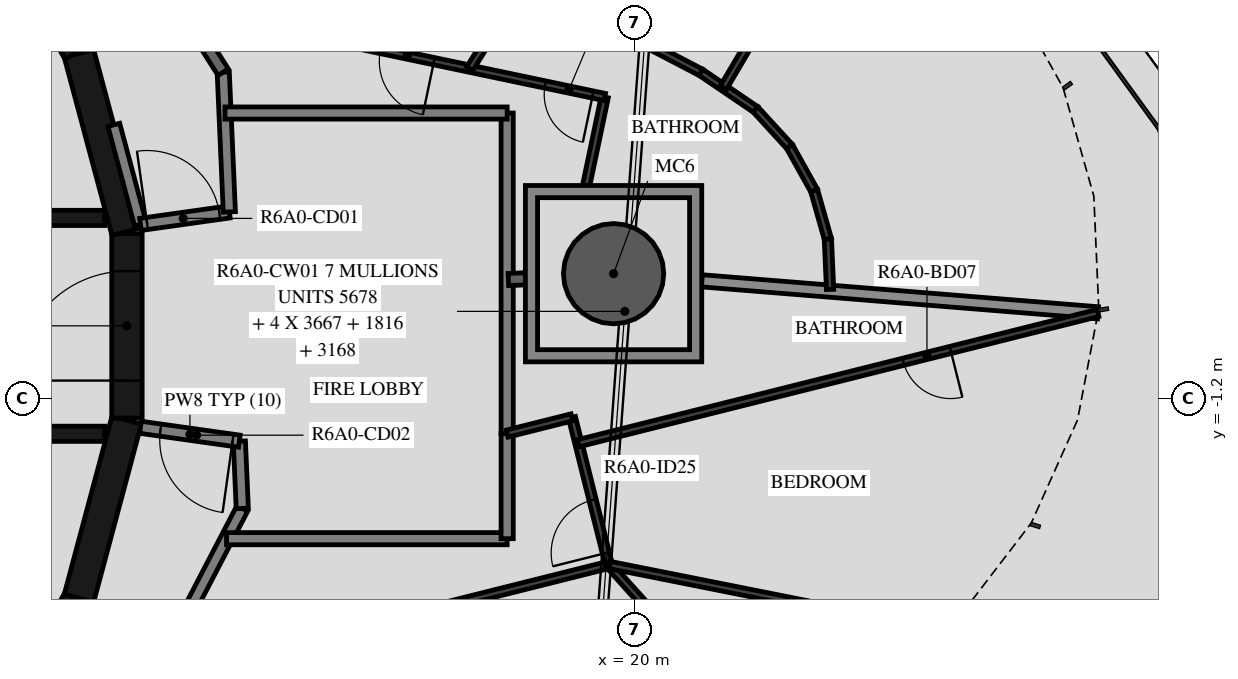
"""IFC4 building model, lengths in metres.
Left out: names, types, materials, properties, quantities, classifications, styles, units other than length and angle.
Written with IfcOpenShell. Run it as: python <this file> out.ifc"""

import sys

from ifc_helpers import new_model, si_unit, direction, frame, frame_2d, origin, origin_2d, place, context, subcontext, project, spatial, polyline, rectangle, hollow_circle, outline, extrude, element, fill, save


model = new_model("IFC4")
c1 = context("Model", 3, precision=1e-05, world=origin(), true_north=direction((0.0, 1.0)))
c2 = subcontext(c1, "Body", "Model", "MODEL_VIEW")
j1 = project(units=[si_unit("LENGTHUNIT", "METRE"), si_unit("PLANEANGLEUNIT", "RADIAN")], contexts=[c1])
p1 = place(None, origin())
s1 = spatial("IfcSite", under=j1, at=p1, CompositionType="ELEMENT")
p2 = place(p1, origin())
s2 = spatial("IfcBuilding", under=s1, at=p2, CompositionType="ELEMENT")
p3 = place(p2, frame((0.0, 0.0, 226.7)))
s3 = spatial("IfcBuildingStorey", under=s2, at=p3, CompositionType="ELEMENT", Elevation=226.7)
p4 = place(p3, frame((19.65, 0.858, -0.45), z_axis=(0.0, 0.0, 1.0), x_axis=(1.0, 0.0, 0.0)))
e1 = element("IfcColumn", 1, at=p4, inside=s3, PredefinedType="COLUMN", context=c2, shape_type="SweptSolid", body=[
    extrude(hollow_circle(Radius=0.825, WallThickness=0.04, at=origin_2d()), origin(), (0.0, 0.0, 1.0), 3.57),
])
for number, where, z_axis, x_axis in (
    (2, (9.329, -7.137, 0.0), (0.0, 0.0, 1.0), (0.5, 0.866, 0.0)),
    (3, (10.858, -4.479, 0.0), (0.0, 0.0, 1.0), (0.259, 0.966, 0.0)),
):
    element("IfcWall", number, at=place(p3, frame(where, z_axis=z_axis, x_axis=x_axis)), inside=s3, PredefinedType="SHEAR", context=c2, shape_type="SweptSolid", body=[
        extrude(rectangle(XDim=3.033, YDim=0.5, at=frame_2d((1.516, 0.0))), origin(), (0.0, 0.0, 1.0), 3.12),
    ])
p5 = place(p3, frame((11.647, -1.516, 0.0), z_axis=(0.0, 0.0, 1.0), x_axis=(0.0, 1.0, 0.0)))
e4 = element("IfcWall", 4, at=p5, inside=s3, PredefinedType="SHEAR", context=c2, shape_type="SweptSolid", body=[
    extrude(rectangle(XDim=3.033, YDim=0.5, at=frame_2d((1.516, 0.0))), origin(), (0.0, 0.0, 1.0), 3.12),
])
p6 = place(p5, frame((0.616, 0.0, 0.0)))
e5 = element("IfcOpeningElement", 5, at=p6, cuts=e4, PredefinedType="OPENING", context=c2, shape_type="SweptSolid", body=[
    extrude(rectangle(XDim=1.8, YDim=2.1, at=frame_2d((0.9, 1.05))), frame((0.0, 0.26, 0.0), z_axis=(0.0, -1.0, 0.0), x_axis=(1.0, 0.0, 0.0)), (0.0, 0.0, 1.0), 0.52),
])
for number, where, z_axis, x_axis in (
    (6, (11.643, 1.55, 0.0), (0.0, 0.0, 1.0), (-0.259, 0.966, 0.0)),
    (7, (10.845, 4.51, 0.0), (0.0, 0.0, 1.0), (-0.5, 0.866, 0.0)),
):
    element("IfcWall", number, at=place(p3, frame(where, z_axis=z_axis, x_axis=x_axis)), inside=s3, PredefinedType="SHEAR", context=c2, shape_type="SweptSolid", body=[
        extrude(rectangle(XDim=3.033, YDim=0.5, at=frame_2d((1.516, 0.0))), origin(), (0.0, 0.0, 1.0), 3.12),
    ])
p7 = place(p3, frame((3.35, 1.775, 0.0), z_axis=(0.0, 0.0, 1.0), x_axis=(1.0, 0.0, 0.0)))
e8 = element("IfcWall", 8, at=p7, inside=s3, PredefinedType="SHEAR", context=c2, shape_type="SweptSolid", body=[
    extrude(rectangle(XDim=7.93, YDim=0.25, at=frame_2d((3.965, 0.0))), origin(), (0.0, 0.0, 1.0), 3.12),
])
p8 = place(p7, frame((0.35, 0.0, 0.0)))
e9 = element("IfcOpeningElement", 9, at=p8, cuts=e8, PredefinedType="OPENING", context=c2, shape_type="SweptSolid", body=[
    extrude(rectangle(XDim=1.2, YDim=2.4, at=frame_2d((0.6, 1.2))), frame((0.0, 0.135, 0.0), z_axis=(0.0, -1.0, 0.0), x_axis=(1.0, 0.0, 0.0)), (0.0, 0.0, 1.0), 0.27),
])
p9 = place(p7, frame((2.5, 0.0, 0.0)))
e10 = element("IfcOpeningElement", 10, at=p9, cuts=e8, PredefinedType="OPENING", context=c2, shape_type="SweptSolid", body=[
    extrude(rectangle(XDim=1.2, YDim=2.4, at=frame_2d((0.6, 1.2))), frame((0.0, 0.135, 0.0), z_axis=(0.0, -1.0, 0.0), x_axis=(1.0, 0.0, 0.0)), (0.0, 0.0, 1.0), 0.27),
])
p10 = place(p7, frame((4.8, 0.0, 0.0)))
e11 = element("IfcOpeningElement", 11, at=p10, cuts=e8, PredefinedType="OPENING", context=c2, shape_type="SweptSolid", body=[
    extrude(rectangle(XDim=0.9, YDim=2.1, at=frame_2d((0.45, 1.05))), frame((0.0, 0.135, 0.0), z_axis=(0.0, -1.0, 0.0), x_axis=(1.0, 0.0, 0.0)), (0.0, 0.0, 1.0), 0.27),
])
p11 = place(p3, frame((3.35, -1.775, 0.0), z_axis=(0.0, 0.0, 1.0), x_axis=(1.0, 0.0, 0.0)))
e12 = element("IfcWall", 12, at=p11, inside=s3, PredefinedType="SHEAR", context=c2, shape_type="SweptSolid", body=[
    extrude(rectangle(XDim=7.93, YDim=0.25, at=frame_2d((3.965, 0.0))), origin(), (0.0, 0.0, 1.0), 3.12),
])
p12 = place(p11, frame((0.4, 0.0, 0.0)))
e13 = element("IfcOpeningElement", 13, at=p12, cuts=e12, PredefinedType="OPENING", context=c2, shape_type="SweptSolid", body=[
    extrude(rectangle(XDim=1.1, YDim=2.4, at=frame_2d((0.55, 1.2))), frame((0.0, 0.135, 0.0), z_axis=(0.0, -1.0, 0.0), x_axis=(1.0, 0.0, 0.0)), (0.0, 0.0, 1.0), 0.27),
])
p13 = place(p11, frame((2.55, 0.0, 0.0)))
e14 = element("IfcOpeningElement", 14, at=p13, cuts=e12, PredefinedType="OPENING", context=c2, shape_type="SweptSolid", body=[
    extrude(rectangle(XDim=1.1, YDim=2.4, at=frame_2d((0.55, 1.2))), frame((0.0, 0.135, 0.0), z_axis=(0.0, -1.0, 0.0), x_axis=(1.0, 0.0, 0.0)), (0.0, 0.0, 1.0), 0.27),
])
p14 = place(p11, frame((4.7, 0.0, 0.0)))
e15 = element("IfcOpeningElement", 15, at=p14, cuts=e12, PredefinedType="OPENING", context=c2, shape_type="SweptSolid", body=[
    extrude(rectangle(XDim=1.1, YDim=2.4, at=frame_2d((0.55, 1.2))), frame((0.0, 0.135, 0.0), z_axis=(0.0, -1.0, 0.0), x_axis=(1.0, 0.0, 0.0)), (0.0, 0.0, 1.0), 0.27),
])
p15 = place(p3, frame((11.87, 1.668, 0.0), z_axis=(0.0, 0.0, 1.0), x_axis=(-0.258836880648, 0.965921047093, 0.0)))
e16 = element("IfcWall", 16, at=p15, inside=s3, PredefinedType="STANDARD", context=c2, shape_type="SweptSolid", body=[
    extrude(rectangle(XDim=1.695, YDim=0.2, at=frame_2d((0.848, 0.0))), origin(), (0.0, 0.0, 1.0), 3.12),
])
p16 = place(p3, frame((11.87, 1.668, 0.0), z_axis=(0.0, 0.0, 1.0), x_axis=(0.990267985606, 0.139173692496, 0.0)))
e17 = element("IfcWall", 17, at=p16, inside=s3, PredefinedType="STANDARD", context=c2, shape_type="SweptSolid", body=[
    extrude(rectangle(XDim=1.475, YDim=0.2, at=frame_2d((0.738, 0.0))), origin(), (0.0, 0.0, 1.0), 3.12),
])
p17 = place(p16, frame((0.11, 0.0, 0.0)))
e18 = element("IfcOpeningElement", 18, at=p17, cuts=e17, PredefinedType="OPENING", context=c2, shape_type="SweptSolid", body=[
    extrude(rectangle(XDim=1.2, YDim=2.1, at=frame_2d((0.6, 1.05))), frame((0.0, 0.11, 0.0), z_axis=(0.0, -1.0, 0.0), x_axis=(1.0, 0.0, 0.0)), (0.0, 0.0, 1.0), 0.22),
])
p18 = place(p3, frame((13.331, 1.874, 0.0), z_axis=(0.0, 0.0, 1.0), x_axis=(-0.043621457762, 0.999048131184, 0.0)))
e19 = element("IfcWall", 19, at=p18, inside=s3, PredefinedType="STANDARD", context=c2, shape_type="SweptSolid", body=[
    extrude(rectangle(XDim=2.3, YDim=0.2, at=frame_2d((1.15, 0.0))), origin(), (0.0, 0.0, 1.0), 3.12),
])
p19 = place(p3, frame((13.231, 4.172, 0.0), z_axis=(0.0, 0.0, 1.0), x_axis=(-0.537304397561, 0.843388394728, 0.0)))
e20 = element("IfcWall", 20, at=p19, inside=s3, PredefinedType="STANDARD", context=c2, shape_type="SweptSolid", body=[
    extrude(rectangle(XDim=7.181, YDim=0.2, at=frame_2d((3.59, 0.0))), origin(), (0.0, 0.0, 1.0), 3.12),
])
p20 = place(p19, frame((2.881, 0.0, 0.0)))
e21 = element("IfcOpeningElement", 21, at=p20, cuts=e20, PredefinedType="OPENING", context=c2, shape_type="SweptSolid", body=[
    extrude(rectangle(XDim=1.0, YDim=2.1, at=frame_2d((0.5, 1.05))), frame((0.0, 0.11, 0.0), z_axis=(0.0, -1.0, 0.0), x_axis=(1.0, 0.0, 0.0)), (0.0, 0.0, 1.0), 0.22),
])
p21 = place(p19, frame((5.681, 0.0, 0.0)))
e22 = element("IfcOpeningElement", 22, at=p21, cuts=e20, PredefinedType="OPENING", context=c2, shape_type="SweptSolid", body=[
    extrude(rectangle(XDim=1.0, YDim=2.1, at=frame_2d((0.5, 1.05))), frame((0.0, 0.11, 0.0), z_axis=(0.0, -1.0, 0.0), x_axis=(1.0, 0.0, 0.0)), (0.0, 0.0, 1.0), 0.22),
])
p22 = place(p3, frame((10.228, -9.372, 0.0), z_axis=(0.0, 0.0, 1.0), x_axis=(0.461759464021, 0.887005184532, 0.0)))
e23 = element("IfcWall", 23, at=p22, inside=s3, PredefinedType="STANDARD", context=c2, shape_type="SweptSolid", body=[
    extrude(rectangle(XDim=7.181, YDim=0.2, at=frame_2d((3.591, 0.0))), origin(), (0.0, 0.0, 1.0), 3.12),
])
p23 = place(p3, frame((13.544, -3.003, 0.0), z_axis=(0.0, 0.0, 1.0), x_axis=(-0.043666917606, 0.999046145234, 0.0)))
e24 = element("IfcWall", 24, at=p23, inside=s3, PredefinedType="STANDARD", context=c2, shape_type="SweptSolid", body=[
    extrude(rectangle(XDim=1.107, YDim=0.2, at=frame_2d((0.553, 0.0))), origin(), (0.0, 0.0, 1.0), 3.12),
])
p24 = place(p3, frame((13.496, -1.897, 0.0), z_axis=(0.0, 0.0, 1.0), x_axis=(-0.99026234641, 0.139213811391, 0.0)))
e25 = element("IfcWall", 25, at=p24, inside=s3, PredefinedType="STANDARD", context=c2, shape_type="SweptSolid", body=[
    extrude(rectangle(XDim=1.641, YDim=0.2, at=frame_2d((0.821, 0.0))), origin(), (0.0, 0.0, 1.0), 3.12),
])
p25 = place(p24, frame((0.11, 0.0, 0.0)))
e26 = element("IfcOpeningElement", 26, at=p25, cuts=e25, PredefinedType="OPENING", context=c2, shape_type="SweptSolid", body=[
    extrude(rectangle(XDim=1.2, YDim=2.1, at=frame_2d((0.6, 1.05))), frame((0.0, 0.11, 0.0), z_axis=(0.0, -1.0, 0.0), x_axis=(1.0, 0.0, 0.0)), (0.0, 0.0, 1.0), 0.22),
])
p26 = place(p3, frame((17.9, -1.772, 0.0), z_axis=(0.0, 0.0, 1.0), x_axis=(0.0, 1.0, 0.0)))
e27 = element("IfcWall", 27, at=p26, inside=s3, PredefinedType="STANDARD", context=c2, shape_type="SweptSolid", body=[
    extrude(rectangle(XDim=5.272, YDim=0.2, at=frame_2d((2.636, 0.0))), origin(), (0.0, 0.0, 1.0), 3.12),
])
p27 = place(p3, frame((17.9, 3.5, 0.0), z_axis=(0.0, 0.0, 1.0), x_axis=(-1.0, 0.0, 0.0)))
e28 = element("IfcWall", 28, at=p27, inside=s3, PredefinedType="STANDARD", context=c2, shape_type="SweptSolid", body=[
    extrude(rectangle(XDim=4.64, YDim=0.2, at=frame_2d((2.32, 0.0))), origin(), (0.0, 0.0, 1.0), 3.12),
])
p28 = place(p3, frame((13.285, -3.5, 0.0), z_axis=(0.0, 0.0, 1.0), x_axis=(1.0, 0.0, 0.0)))
e29 = element("IfcWall", 29, at=p28, inside=s3, PredefinedType="STANDARD", context=c2, shape_type="SweptSolid", body=[
    extrude(rectangle(XDim=4.615, YDim=0.2, at=frame_2d((2.308, 0.0))), origin(), (0.0, 0.0, 1.0), 3.12),
])
p29 = place(p3, frame((17.9, -3.5, 0.0), z_axis=(0.0, 0.0, 1.0), x_axis=(0.0, 1.0, 0.0)))
e30 = element("IfcWall", 30, at=p29, inside=s3, PredefinedType="STANDARD", context=c2, shape_type="SweptSolid", body=[
    extrude(rectangle(XDim=1.728, YDim=0.2, at=frame_2d((0.864, 0.0))), origin(), (0.0, 0.0, 1.0), 3.12),
])
p30 = place(p3, frame((17.92, 0.761, 0.0), z_axis=(0.0, 0.0, 1.0), x_axis=(0.999051221661, 0.04355061995, 0.0)))
e31 = element("IfcWall", 31, at=p30, inside=s3, PredefinedType="STANDARD", context=c2, shape_type="SweptSolid", body=[
    extrude(rectangle(XDim=0.28, YDim=0.2, at=frame_2d((0.14, 0.0))), origin(), (0.0, 0.0, 1.0), 3.12),
])
p31 = place(p3, frame((21.1, 0.741, 0.0), z_axis=(0.0, 0.0, 1.0), x_axis=(0.996750718609, -0.080548153006, 0.0)))
e32 = element("IfcWall", 32, at=p31, inside=s3, PredefinedType="STANDARD", context=c2, shape_type="SweptSolid", body=[
    extrude(rectangle(XDim=6.538, YDim=0.2, at=frame_2d((3.269, 0.0))), origin(), (0.0, 0.0, 1.0), 2.73),
])
p32 = place(p3, frame((19.199, 2.308, 0.0), z_axis=(0.0, 0.0, 1.0), x_axis=(0.205580140246, 0.978640284239, 0.0)))
e33 = element("IfcWall", 33, at=p32, inside=s3, PredefinedType="PARTITIONING", context=c2, shape_type="SweptSolid", body=[
    extrude(rectangle(XDim=1.487, YDim=0.12, at=frame_2d((0.743, 0.0))), origin(), (0.0, 0.0, 1.0), 3.12),
])
p33 = place(p3, frame((19.505, 3.763, 0.0), z_axis=(0.0, 0.0, 1.0), x_axis=(-0.978660081285, 0.205485876157, 0.0)))
e34 = element("IfcWall", 34, at=p33, inside=s3, PredefinedType="PARTITIONING", context=c2, shape_type="SweptSolid", body=[
    extrude(rectangle(XDim=4.996, YDim=0.12, at=frame_2d((2.498, 0.0))), origin(), (0.0, 0.0, 1.0), 3.12),
])
p34 = place(p33, frame((0.2, 0.0, 0.0)))
e35 = element("IfcOpeningElement", 35, at=p34, cuts=e34, PredefinedType="OPENING", context=c2, shape_type="SweptSolid", body=[
    extrude(rectangle(XDim=0.8, YDim=2.1, at=frame_2d((0.4, 1.05))), frame((0.0, 0.07, 0.0), z_axis=(0.0, -1.0, 0.0), x_axis=(1.0, 0.0, 0.0)), (0.0, 0.0, 1.0), 0.14),
])
p35 = place(p33, frame((2.869, 0.0, 0.0)))
e36 = element("IfcOpeningElement", 36, at=p35, cuts=e34, PredefinedType="OPENING", context=c2, shape_type="SweptSolid", body=[
    extrude(rectangle(XDim=0.9, YDim=2.1, at=frame_2d((0.45, 1.05))), frame((0.0, 0.07, 0.0), z_axis=(0.0, -1.0, 0.0), x_axis=(1.0, 0.0, 0.0)), (0.0, 0.0, 1.0), 0.14),
])
p36 = place(p3, frame((21.085, 4.169, 0.0), z_axis=(0.0, 0.0, 1.0), x_axis=(0.827390024541, -0.561627765776, 0.0)))
e37 = element("IfcWall", 37, at=p36, inside=s3, PredefinedType="PARTITIONING", context=c2, shape_type="SweptSolid", body=[
    extrude(rectangle(XDim=1.087, YDim=0.12, at=frame_2d((0.543, 0.0))), origin(), (0.0, 0.0, 1.0), 3.12),
])
p37 = place(p3, frame((21.984, 3.559, 0.0), z_axis=(0.0, 0.0, 1.0), x_axis=(0.675497816835, -0.737361986715, 0.0)))
e38 = element("IfcWall", 38, at=p37, inside=s3, PredefinedType="PARTITIONING", context=c2, shape_type="SweptSolid", body=[
    extrude(rectangle(XDim=0.829, YDim=0.12, at=frame_2d((0.415, 0.0))), origin(), (0.0, 0.0, 1.0), 3.12),
])
p38 = place(p3, frame((22.544, 2.948, 0.0), z_axis=(0.0, 0.0, 1.0), x_axis=(0.487392269075, -0.873183128585, 0.0)))
e39 = element("IfcWall", 39, at=p38, inside=s3, PredefinedType="PARTITIONING", context=c2, shape_type="SweptSolid", body=[
    extrude(rectangle(XDim=0.829, YDim=0.12, at=frame_2d((0.415, 0.0))), origin(), (0.0, 0.0, 1.0), 3.12),
])
for number, where, z_axis, x_axis in (
    (40, (22.948, 2.224, 0.0), (0.0, 0.0, 1.0), (0.273, -0.962, 0.0)),
    (41, (23.174, 1.427, 0.0), (0.0, 0.0, 1.0), (0.044, -0.999, 0.0)),
):
    element("IfcWall", number, at=place(p3, frame(where, z_axis=z_axis, x_axis=x_axis)), inside=s3, PredefinedType="PARTITIONING", context=c2, shape_type="SweptSolid", body=[
        extrude(rectangle(XDim=0.829, YDim=0.12, at=frame_2d((0.415, 0.0))), origin(), (0.0, 0.0, 1.0), 3.12),
    ])
p39 = place(p3, frame((23.696, 7.715, 0.0), z_axis=(0.0, 0.0, 1.0), x_axis=(-0.508219920645, -0.861227329025, 0.0)))
e42 = element("IfcWall", 42, at=p39, inside=s3, PredefinedType="PARTITIONING", context=c2, shape_type="SweptSolid", body=[
    extrude(rectangle(XDim=4.409, YDim=0.12, at=frame_2d((2.205, 0.0))), origin(), (0.0, 0.0, 1.0), 3.12),
])
p40 = place(p39, frame((0.2, 0.0, 0.0)))
e43 = element("IfcOpeningElement", 43, at=p40, cuts=e42, PredefinedType="OPENING", context=c2, shape_type="SweptSolid", body=[
    extrude(rectangle(XDim=0.9, YDim=2.1, at=frame_2d((0.45, 1.05))), frame((0.0, 0.07, 0.0), z_axis=(0.0, -1.0, 0.0), x_axis=(1.0, 0.0, 0.0)), (0.0, 0.0, 1.0), 0.14),
])
p41 = place(p3, frame((18.189, 5.677, 0.0), z_axis=(0.0, 0.0, 1.0), x_axis=(-0.529639004581, -0.848223157445, 0.0)))
e44 = element("IfcWall", 44, at=p41, inside=s3, PredefinedType="PARTITIONING", context=c2, shape_type="SweptSolid", body=[
    extrude(rectangle(XDim=1.707, YDim=0.12, at=frame_2d((0.854, 0.0))), origin(), (0.0, 0.0, 1.0), 3.12),
])
p42 = place(p3, frame((21.085, 4.169, 0.0), z_axis=(0.0, 0.0, 1.0), x_axis=(-0.887017373034, 0.461736050071, 0.0)))
e45 = element("IfcWall", 45, at=p42, inside=s3, PredefinedType="PARTITIONING", context=c2, shape_type="SweptSolid", body=[
    extrude(rectangle(XDim=10.247, YDim=0.12, at=frame_2d((5.123, 0.0))), origin(), (0.0, 0.0, 1.0), 3.12),
])
p43 = place(p42, frame((3.425, 0.0, 0.0)))
e46 = element("IfcOpeningElement", 46, at=p43, cuts=e45, PredefinedType="OPENING", context=c2, shape_type="SweptSolid", body=[
    extrude(rectangle(XDim=0.9, YDim=2.1, at=frame_2d((0.45, 1.05))), frame((0.0, 0.07, 0.0), z_axis=(0.0, -1.0, 0.0), x_axis=(1.0, 0.0, 0.0)), (0.0, 0.0, 1.0), 0.14),
])
p44 = place(p3, frame((14.029, -5.32, 0.0), z_axis=(0.0, 0.0, 1.0), x_axis=(0.969999099814, 0.243108507378, 0.0)))
e47 = element("IfcWall", 47, at=p44, inside=s3, PredefinedType="PARTITIONING", context=c2, shape_type="SweptSolid", body=[
    extrude(rectangle(XDim=5.715, YDim=0.12, at=frame_2d((2.857, 0.0))), origin(), (0.0, 0.0, 1.0), 3.12),
])
p45 = place(p3, frame((19.573, -3.93, 0.0), z_axis=(0.0, 0.0, 1.0), x_axis=(-0.243155959183, 0.96998720585, 0.0)))
e48 = element("IfcWall", 48, at=p45, inside=s3, PredefinedType="PARTITIONING", context=c2, shape_type="SweptSolid", body=[
    extrude(rectangle(XDim=2.5, YDim=0.12, at=frame_2d((1.25, 0.0))), origin(), (0.0, 0.0, 1.0), 3.12),
])
p46 = place(p45, frame((0.2, 0.0, 0.0)))
e49 = element("IfcOpeningElement", 49, at=p46, cuts=e48, PredefinedType="OPENING", context=c2, shape_type="SweptSolid", body=[
    extrude(rectangle(XDim=0.9, YDim=2.1, at=frame_2d((0.45, 1.05))), frame((0.0, 0.07, 0.0), z_axis=(0.0, -1.0, 0.0), x_axis=(1.0, 0.0, 0.0)), (0.0, 0.0, 1.0), 0.14),
])
p47 = place(p3, frame((18.965, -1.505, 0.0), z_axis=(0.0, 0.0, 1.0), x_axis=(-0.969998406835, -0.243111272339, 0.0)))
e50 = element("IfcWall", 50, at=p47, inside=s3, PredefinedType="PARTITIONING", context=c2, shape_type="SweptSolid", body=[
    extrude(rectangle(XDim=1.098, YDim=0.12, at=frame_2d((0.549, 0.0))), origin(), (0.0, 0.0, 1.0), 3.12),
])
p48 = place(p3, frame((22.284, -6.949, 0.0), z_axis=(0.0, 0.0, 1.0), x_axis=(-0.668156639948, 0.744020634454, 0.0)))
e51 = element("IfcWall", 51, at=p48, inside=s3, PredefinedType="PARTITIONING", context=c2, shape_type="SweptSolid", body=[
    extrude(rectangle(XDim=4.058, YDim=0.12, at=frame_2d((2.029, 0.0))), origin(), (0.0, 0.0, 1.0), 3.12),
])
p49 = place(p48, frame((0.2, 0.0, 0.0)))
e52 = element("IfcOpeningElement", 52, at=p49, cuts=e51, PredefinedType="OPENING", context=c2, shape_type="SweptSolid", body=[
    extrude(rectangle(XDim=0.9, YDim=2.1, at=frame_2d((0.45, 1.05))), frame((0.0, 0.07, 0.0), z_axis=(0.0, -1.0, 0.0), x_axis=(1.0, 0.0, 0.0)), (0.0, 0.0, 1.0), 0.14),
])
p50 = place(p3, frame((25.021, -5.015, 0.0), z_axis=(0.0, 0.0, 1.0), x_axis=(-0.98075605246, 0.195237203328, 0.0)))
e53 = element("IfcWall", 53, at=p50, inside=s3, PredefinedType="PARTITIONING", context=c2, shape_type="SweptSolid", body=[
    extrude(rectangle(XDim=5.556, YDim=0.12, at=frame_2d((2.778, 0.0))), origin(), (0.0, 0.0, 1.0), 3.12),
])
p51 = place(p3, frame((27.616, 0.212, 0.0), z_axis=(0.0, 0.0, 1.0), x_axis=(-0.969995609005, -0.243122435227, 0.0)))
e54 = element("IfcWall", 54, at=p51, inside=s3, PredefinedType="PARTITIONING", context=c2, shape_type="SweptSolid", body=[
    extrude(rectangle(XDim=8.81, YDim=0.12, at=frame_2d((4.405, 0.0))), origin(), (0.0, 0.0, 1.0), 3.12),
])
p52 = place(p51, frame((2.5, 0.0, 0.0)))
e55 = element("IfcOpeningElement", 55, at=p52, cuts=e54, PredefinedType="OPENING", context=c2, shape_type="SweptSolid", body=[
    extrude(rectangle(XDim=0.8, YDim=2.1, at=frame_2d((0.4, 1.05))), frame((0.0, 0.07, 0.0), z_axis=(0.0, -1.0, 0.0), x_axis=(1.0, 0.0, 0.0)), (0.0, 0.0, 1.0), 0.14),
])
p53 = place(p3, origin())
e56 = element("IfcWall", 56, at=p53, inside=s3, PredefinedType="STANDARD", context=c2, shape_type="SweptSolid", body=[
    extrude(outline(polyline([(21.1, 2.308), (21.1, -0.592), (18.2, -0.592), (18.2, 2.308), (21.1, 2.308)]), holes=[polyline([(18.4, -0.392), (20.9, -0.392), (20.9, 2.108), (18.4, 2.108), (18.4, -0.392)])]), origin(), (0.0, 0.0, 1.0), 3.12),
])
p54 = place(p6, origin())
e57 = element("IfcDoor", 57, at=p54, inside=s3, OperationType="DOUBLE_DOOR_SINGLE_SWING", PredefinedType="DOOR", context=c2, shape_type="SweptSolid", body=[
    extrude(rectangle(XDim=1.8, YDim=2.1, at=frame_2d((0.9, 1.05))), frame((0.0, 0.025, 0.0), z_axis=(0.0, -1.0, 0.0), x_axis=(1.0, 0.0, 0.0)), (0.0, 0.0, 1.0), 0.05),
])
fill(e5, e57)
p55 = place(p34, origin())
e58 = element("IfcDoor", 58, at=p55, inside=s3, OperationType="SINGLE_SWING_LEFT", PredefinedType="DOOR", context=c2, shape_type="SweptSolid", body=[
    extrude(rectangle(XDim=0.8, YDim=2.1, at=frame_2d((0.4, 1.05))), frame((0.0, 0.025, 0.0), z_axis=(0.0, -1.0, 0.0), x_axis=(1.0, 0.0, 0.0)), (0.0, 0.0, 1.0), 0.05),
])
fill(e35, e58)
p56 = place(p35, origin())
e59 = element("IfcDoor", 59, at=p56, inside=s3, OperationType="SINGLE_SWING_LEFT", PredefinedType="DOOR", context=c2, shape_type="SweptSolid", body=[
    extrude(rectangle(XDim=0.9, YDim=2.1, at=frame_2d((0.45, 1.05))), frame((0.0, 0.025, 0.0), z_axis=(0.0, -1.0, 0.0), x_axis=(1.0, 0.0, 0.0)), (0.0, 0.0, 1.0), 0.05),
])
fill(e36, e59)
p57 = place(p46, origin())
e60 = element("IfcDoor", 60, at=p57, inside=s3, OperationType="SINGLE_SWING_RIGHT", PredefinedType="DOOR", context=c2, shape_type="SweptSolid", body=[
    extrude(rectangle(XDim=0.9, YDim=2.1, at=frame_2d((0.45, 1.05))), frame((0.0, 0.025, 0.0), z_axis=(0.0, -1.0, 0.0), x_axis=(1.0, 0.0, 0.0)), (0.0, 0.0, 1.0), 0.05),
])
fill(e49, e60)
p58 = place(p52, origin())
e61 = element("IfcDoor", 61, at=p58, inside=s3, OperationType="SINGLE_SWING_RIGHT", PredefinedType="DOOR", context=c2, shape_type="SweptSolid", body=[
    extrude(rectangle(XDim=0.8, YDim=2.1, at=frame_2d((0.4, 1.05))), frame((0.0, 0.025, 0.0), z_axis=(0.0, -1.0, 0.0), x_axis=(1.0, 0.0, 0.0)), (0.0, 0.0, 1.0), 0.05),
])
fill(e55, e61)
p59 = place(p17, origin())
e62 = element("IfcDoor", 62, at=p59, inside=s3, OperationType="DOUBLE_DOOR_SINGLE_SWING", PredefinedType="DOOR", context=c2, shape_type="SweptSolid", body=[
    extrude(rectangle(XDim=1.2, YDim=2.1, at=frame_2d((0.6, 1.05))), frame((0.0, 0.025, 0.0), z_axis=(0.0, -1.0, 0.0), x_axis=(1.0, 0.0, 0.0)), (0.0, 0.0, 1.0), 0.05),
])
fill(e18, e62)
p60 = place(p25, origin())
e63 = element("IfcDoor", 63, at=p60, inside=s3, OperationType="DOUBLE_DOOR_SINGLE_SWING", PredefinedType="DOOR", context=c2, shape_type="SweptSolid", body=[
    extrude(rectangle(XDim=1.2, YDim=2.1, at=frame_2d((0.6, 1.05))), frame((0.0, 0.025, 0.0), z_axis=(0.0, -1.0, 0.0), x_axis=(1.0, 0.0, 0.0)), (0.0, 0.0, 1.0), 0.05),
])
fill(e26, e63)
save(model, sys.argv[1])
